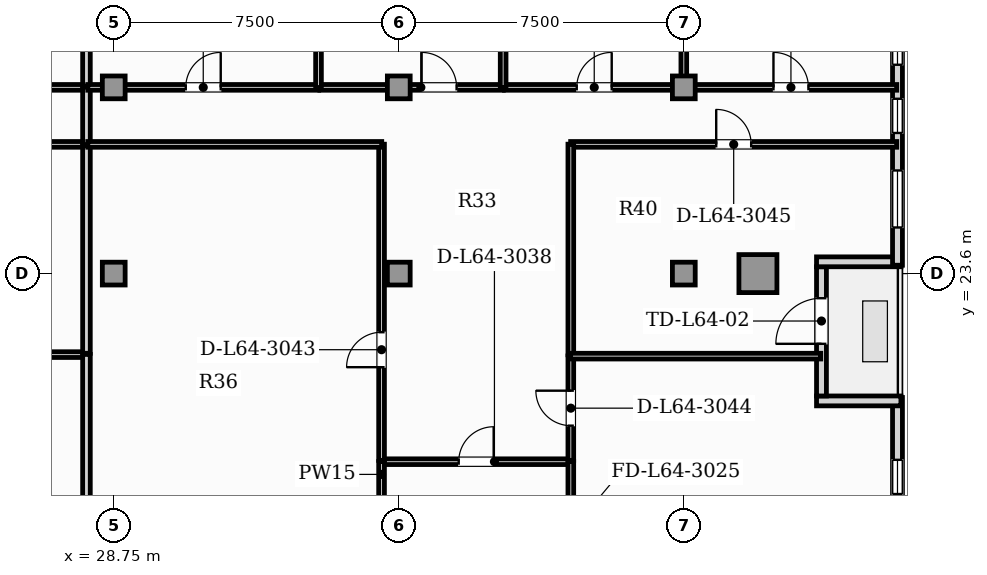
"""IFC4 building model, lengths in metres.
Left out: names, types, materials, properties, quantities, classifications, styles, units other than length and angle.
Written with IfcOpenShell. Run it as: python <this file> out.ifc"""

import sys

from ifc_helpers import new_model, si_unit, direction, frame, frame_2d, origin, origin_2d, place, context, subcontext, project, spatial, rectangle, hollow_rectangle, extrude, element, fill, save


model = new_model("IFC4")
c1 = context("Model", 3, precision=1e-05, world=origin(), true_north=direction((0.0, 1.0)))
c2 = subcontext(c1, "Body", "Model", "MODEL_VIEW")
j1 = project(units=[si_unit("LENGTHUNIT", "METRE"), si_unit("PLANEANGLEUNIT", "RADIAN")], contexts=[c1])
p1 = place(None, origin())
s1 = spatial("IfcSite", under=j1, at=p1, CompositionType="ELEMENT")
p2 = place(p1, origin())
s2 = spatial("IfcBuilding", under=s1, at=p2, CompositionType="ELEMENT")
p3 = place(p2, frame((0.0, 0.0, 260.6)))
s3 = spatial("IfcBuildingStorey", under=s2, at=p3, CompositionType="ELEMENT", Elevation=260.6)
p4 = place(p3, frame((45.7, 23.6, 0.0), z_axis=(0.0, 0.0, 1.0), x_axis=(1.0, 0.0, 0.0)))
e1 = element("IfcColumn", 1, at=p4, inside=s3, PredefinedType="USERDEFINED", context=c2, shape_type="SweptSolid", body=[
    extrude(hollow_rectangle(XDim=1.0, YDim=1.0, WallThickness=0.06, at=origin_2d()), origin(), (0.0, 0.0, 1.0), 3.85),
])
for number, where, z_axis, x_axis in (
    (2, (28.75, 23.6, 0.0), (0.0, 0.0, 1.0), (1.0, 0.0, 0.0)),
    (3, (36.25, 23.6, 0.0), (0.0, 0.0, 1.0), (1.0, 0.0, 0.0)),
    (4, (43.75, 23.6, 0.0), (0.0, 0.0, 1.0), (1.0, 0.0, 0.0)),
    (5, (28.75, 28.5, 0.0), (0.0, 0.0, 1.0), (1.0, 0.0, 0.0)),
    (6, (36.25, 28.5, 0.0), (0.0, 0.0, 1.0), (1.0, 0.0, 0.0)),
    (7, (43.75, 28.5, 0.0), (0.0, 0.0, 1.0), (1.0, 0.0, 0.0)),
):
    element("IfcColumn", number, at=place(p3, frame(where, z_axis=z_axis, x_axis=x_axis)), inside=s3, PredefinedType="COLUMN", context=c2, shape_type="SweptSolid", body=[
        extrude(rectangle(XDim=0.6, YDim=0.6, at=origin_2d()), origin(), (0.0, 0.0, 1.0), 3.85),
    ])
p5 = place(p3, frame((49.372, 3.24, 0.0), z_axis=(0.0, 0.0, 1.0), x_axis=(0.0, 1.0, 0.0)))
e8 = element("IfcWall", 8, at=p5, inside=s3, PredefinedType="SOLIDWALL", context=c2, shape_type="SweptSolid", body=[
    extrude(rectangle(XDim=17.1, YDim=0.26, at=frame_2d((8.55, 0.0))), origin(), (0.0, 0.0, 1.0), 3.65),
])
p6 = place(p5, frame((11.055, 0.0, 0.95)))
e9 = element("IfcOpeningElement", 9, at=p6, cuts=e8, PredefinedType="OPENING", context=c2, shape_type="SweptSolid", body=[
    extrude(rectangle(XDim=0.9, YDim=1.5, at=frame_2d((0.45, 0.75))), frame((0.0, 0.14, 0.0), z_axis=(0.0, -1.0, 0.0), x_axis=(1.0, 0.0, 0.0)), (0.0, 0.0, 1.0), 0.28),
])
p7 = place(p5, frame((12.885, 0.0, 0.95)))
e10 = element("IfcOpeningElement", 10, at=p7, cuts=e8, PredefinedType="OPENING", context=c2, shape_type="SweptSolid", body=[
    extrude(rectangle(XDim=0.9, YDim=1.5, at=frame_2d((0.45, 0.75))), frame((0.0, 0.14, 0.0), z_axis=(0.0, -1.0, 0.0), x_axis=(1.0, 0.0, 0.0)), (0.0, 0.0, 1.0), 0.28),
])
p8 = place(p5, frame((14.56, 0.0, 0.95)))
e11 = element("IfcOpeningElement", 11, at=p8, cuts=e8, PredefinedType="OPENING", context=c2, shape_type="SweptSolid", body=[
    extrude(rectangle(XDim=0.9, YDim=1.5, at=frame_2d((0.45, 0.75))), frame((0.0, 0.14, 0.0), z_axis=(0.0, -1.0, 0.0), x_axis=(1.0, 0.0, 0.0)), (0.0, 0.0, 1.0), 0.28),
])
p9 = place(p3, frame((49.462, 20.25, 0.0), z_axis=(0.0, 0.0, 1.0), x_axis=(-1.0, 0.0, 0.0)))
e12 = element("IfcWall", 12, at=p9, inside=s3, PredefinedType="SOLIDWALL", context=c2, shape_type="SweptSolid", body=[
    extrude(rectangle(XDim=2.22, YDim=0.26, at=frame_2d((1.11, 0.0))), origin(), (0.0, 0.0, 1.0), 3.65),
])
p10 = place(p3, frame((47.372, 20.38, 0.0), z_axis=(0.0, 0.0, 1.0), x_axis=(0.0, 1.0, 0.0)))
e13 = element("IfcWall", 13, at=p10, inside=s3, PredefinedType="SOLIDWALL", context=c2, shape_type="SweptSolid", body=[
    extrude(rectangle(XDim=3.4, YDim=0.26, at=frame_2d((1.7, 0.0))), origin(), (0.0, 0.0, 1.0), 3.19),
])
p11 = place(p10, frame((1.372, 0.0, 0.0)))
e14 = element("IfcOpeningElement", 14, at=p11, cuts=e13, PredefinedType="OPENING", context=c2, shape_type="SweptSolid", body=[
    extrude(rectangle(XDim=1.2, YDim=2.2, at=frame_2d((0.6, 1.1))), frame((0.0, 0.14, 0.0), z_axis=(0.0, -1.0, 0.0), x_axis=(1.0, 0.0, 0.0)), (0.0, 0.0, 1.0), 0.28),
])
p12 = place(p3, frame((47.242, 23.91, 0.0), z_axis=(0.0, 0.0, 1.0), x_axis=(1.0, 0.0, 0.0)))
e15 = element("IfcWall", 15, at=p12, inside=s3, PredefinedType="SOLIDWALL", context=c2, shape_type="SweptSolid", body=[
    extrude(rectangle(XDim=2.22, YDim=0.26, at=frame_2d((1.11, 0.0))), origin(), (0.0, 0.0, 1.0), 3.65),
])
p13 = place(p3, frame((49.372, 23.82, 0.0), z_axis=(0.0, 0.0, 1.0), x_axis=(0.0, 1.0, 0.0)))
e16 = element("IfcWall", 16, at=p13, inside=s3, PredefinedType="SOLIDWALL", context=c2, shape_type="SweptSolid", body=[
    extrude(rectangle(XDim=8.7, YDim=0.26, at=frame_2d((4.35, 0.0))), origin(), (0.0, 0.0, 1.0), 3.65),
])
p14 = place(p13, frame((3.48, 0.0, 0.95)))
e17 = element("IfcOpeningElement", 17, at=p14, cuts=e16, PredefinedType="OPENING", context=c2, shape_type="SweptSolid", body=[
    extrude(rectangle(XDim=0.9, YDim=1.5, at=frame_2d((0.45, 0.75))), frame((0.0, 0.14, 0.0), z_axis=(0.0, -1.0, 0.0), x_axis=(1.0, 0.0, 0.0)), (0.0, 0.0, 1.0), 0.28),
])
p15 = place(p13, frame((0.993, 0.0, 0.9)))
e18 = element("IfcOpeningElement", 18, at=p15, cuts=e16, PredefinedType="OPENING", context=c2, shape_type="SweptSolid", body=[
    extrude(rectangle(XDim=1.5, YDim=1.95, at=frame_2d((0.75, 0.975))), frame((0.0, 0.14, 0.0), z_axis=(0.0, -1.0, 0.0), x_axis=(1.0, 0.0, 0.0)), (0.0, 0.0, 1.0), 0.28),
])
p16 = place(p13, frame((5.275, 0.0, 0.9)))
e19 = element("IfcOpeningElement", 19, at=p16, cuts=e16, PredefinedType="OPENING", context=c2, shape_type="SweptSolid", body=[
    extrude(rectangle(XDim=1.5, YDim=1.95, at=frame_2d((0.75, 0.975))), frame((0.0, 0.14, 0.0), z_axis=(0.0, -1.0, 0.0), x_axis=(1.0, 0.0, 0.0)), (0.0, 0.0, 1.0), 0.28),
])
p17 = place(p3, frame((20.895, 27.0, 0.0), z_axis=(0.0, 0.0, 1.0), x_axis=(1.0, 0.0, 0.0)))
e20 = element("IfcWall", 20, at=p17, inside=s3, PredefinedType="PARTITIONING", context=c2, shape_type="SweptSolid", body=[
    extrude(rectangle(XDim=7.143, YDim=0.15, at=frame_2d((3.571, 0.0))), origin(), (0.0, 0.0, 1.0), 3.65),
])
p18 = place(p17, frame((3.111, 0.0, 0.0)))
e21 = element("IfcOpeningElement", 21, at=p18, cuts=e20, PredefinedType="OPENING", context=c2, shape_type="SweptSolid", body=[
    extrude(rectangle(XDim=0.92, YDim=2.1, at=frame_2d((0.46, 1.05))), frame((0.0, 0.085, 0.0), z_axis=(0.0, -1.0, 0.0), x_axis=(1.0, 0.0, 0.0)), (0.0, 0.0, 1.0), 0.17),
])
p19 = place(p3, frame((22.539, 28.5, 0.0), z_axis=(0.0, 0.0, 1.0), x_axis=(1.0, 0.0, 0.0)))
e22 = element("IfcWall", 22, at=p19, inside=s3, PredefinedType="PARTITIONING", context=c2, shape_type="SweptSolid", body=[
    extrude(rectangle(XDim=5.499, YDim=0.15, at=frame_2d((2.749, 0.0))), origin(), (0.0, 0.0, 1.0), 3.105),
])
p20 = place(p19, frame((2.289, 0.0, 0.0)))
e23 = element("IfcOpeningElement", 23, at=p20, cuts=e22, PredefinedType="OPENING", context=c2, shape_type="SweptSolid", body=[
    extrude(rectangle(XDim=0.92, YDim=2.1, at=frame_2d((0.46, 1.05))), frame((0.0, 0.085, 0.0), z_axis=(0.0, -1.0, 0.0), x_axis=(1.0, 0.0, 0.0)), (0.0, 0.0, 1.0), 0.17),
])
p21 = place(p3, frame((28.032, 26.995, 0.0), z_axis=(0.0, 0.0, 1.0), x_axis=(0.0, 1.0, 0.0)))
e24 = element("IfcWall", 24, at=p21, inside=s3, PredefinedType="PARTITIONING", context=c2, shape_type="SweptSolid", body=[
    extrude(rectangle(XDim=1.51, YDim=0.2, at=frame_2d((0.755, 0.0))), origin(), (0.0, 0.0, 1.0), 3.65),
])
p22 = place(p3, frame((20.895, 21.469, 0.0), z_axis=(0.0, 0.0, 1.0), x_axis=(1.0, 0.0, 0.0)))
e25 = element("IfcWall", 25, at=p22, inside=s3, PredefinedType="PARTITIONING", context=c2, shape_type="SweptSolid", body=[
    extrude(rectangle(XDim=7.143, YDim=0.15, at=frame_2d((3.571, 0.0))), origin(), (0.0, 0.0, 1.0), 3.65),
])
p23 = place(p3, frame((28.032, 17.525, 0.0), z_axis=(0.0, 0.0, 1.0), x_axis=(0.0, 1.0, 0.0)))
e26 = element("IfcWall", 26, at=p23, inside=s3, PredefinedType="PARTITIONING", context=c2, shape_type="SweptSolid", body=[
    extrude(rectangle(XDim=3.948, YDim=0.2, at=frame_2d((1.974, 0.0))), origin(), (0.0, 0.0, 1.0), 3.65),
])
p24 = place(p3, frame((28.032, 21.503, 0.0), z_axis=(0.0, 0.0, 1.0), x_axis=(0.0, 1.0, 0.0)))
e27 = element("IfcWall", 27, at=p24, inside=s3, PredefinedType="PARTITIONING", context=c2, shape_type="SweptSolid", body=[
    extrude(rectangle(XDim=5.462, YDim=0.2, at=frame_2d((2.731, 0.0))), origin(), (0.0, 0.0, 1.0), 3.65),
])
p25 = place(p3, frame((28.032, 28.535, 0.0), z_axis=(0.0, 0.0, 1.0), x_axis=(0.0, 1.0, 0.0)))
e28 = element("IfcWall", 28, at=p25, inside=s3, PredefinedType="PARTITIONING", context=c2, shape_type="SweptSolid", body=[
    extrude(rectangle(XDim=7.076, YDim=0.2, at=frame_2d((3.538, 0.0))), origin(), (0.0, 0.0, 1.0), 3.65),
])
p26 = place(p3, frame((35.792, 18.651, 0.0), z_axis=(0.0, 0.0, 1.0), x_axis=(1.0, 0.0, 0.0)))
e29 = element("IfcWall", 29, at=p26, inside=s3, PredefinedType="PARTITIONING", context=c2, shape_type="SweptSolid", body=[
    extrude(rectangle(XDim=4.99, YDim=0.15, at=frame_2d((2.495, 0.0))), origin(), (0.0, 0.0, 1.0), 3.65),
])
p27 = place(p26, frame((2.035, 0.0, 0.0)))
e30 = element("IfcOpeningElement", 30, at=p27, cuts=e29, PredefinedType="OPENING", context=c2, shape_type="SweptSolid", body=[
    extrude(rectangle(XDim=0.92, YDim=2.1, at=frame_2d((0.46, 1.05))), frame((0.0, 0.085, 0.0), z_axis=(0.0, -1.0, 0.0), x_axis=(1.0, 0.0, 0.0)), (0.0, 0.0, 1.0), 0.17),
])
for number, where, z_axis, x_axis in (
    (31, (35.797, 17.525, 0.0), (0.0, 0.0, 1.0), (0.0, 1.0, 0.0)),
    (32, (40.777, 17.525, 0.0), (0.0, 0.0, 1.0), (0.0, 1.0, 0.0)),
):
    element("IfcWall", number, at=place(p3, frame(where, z_axis=z_axis, x_axis=x_axis)), inside=s3, PredefinedType="PARTITIONING", context=c2, shape_type="SweptSolid", body=[
        extrude(rectangle(XDim=1.131, YDim=0.15, at=frame_2d((0.565, 0.0))), origin(), (0.0, 0.0, 1.0), 3.65),
    ])
p28 = place(p3, frame((35.797, 18.686, 0.0), z_axis=(0.0, 0.0, 1.0), x_axis=(0.0, 1.0, 0.0)))
e33 = element("IfcWall", 33, at=p28, inside=s3, PredefinedType="PARTITIONING", context=c2, shape_type="SweptSolid", body=[
    extrude(rectangle(XDim=8.319, YDim=0.15, at=frame_2d((4.16, 0.0))), origin(), (0.0, 0.0, 1.0), 3.65),
])
p29 = place(p28, frame((2.452, 0.0, 0.0)))
e34 = element("IfcOpeningElement", 34, at=p29, cuts=e33, PredefinedType="OPENING", context=c2, shape_type="SweptSolid", body=[
    extrude(rectangle(XDim=0.92, YDim=2.1, at=frame_2d((0.46, 1.05))), frame((0.0, 0.085, 0.0), z_axis=(0.0, -1.0, 0.0), x_axis=(1.0, 0.0, 0.0)), (0.0, 0.0, 1.0), 0.17),
])
p30 = place(p3, frame((28.067, 27.0, 0.0), z_axis=(0.0, 0.0, 1.0), x_axis=(1.0, 0.0, 0.0)))
e35 = element("IfcWall", 35, at=p30, inside=s3, PredefinedType="PARTITIONING", context=c2, shape_type="SweptSolid", body=[
    extrude(rectangle(XDim=7.735, YDim=0.15, at=frame_2d((3.867, 0.0))), origin(), (0.0, 0.0, 1.0), 3.65),
])
p31 = place(p3, frame((40.777, 18.686, 0.0), z_axis=(0.0, 0.0, 1.0), x_axis=(0.0, 1.0, 0.0)))
e36 = element("IfcWall", 36, at=p31, inside=s3, PredefinedType="PARTITIONING", context=c2, shape_type="SweptSolid", body=[
    extrude(rectangle(XDim=2.747, YDim=0.15, at=frame_2d((1.374, 0.0))), origin(), (0.0, 0.0, 1.0), 3.65),
])
p32 = place(p31, frame((0.914, 0.0, 0.0)))
e37 = element("IfcOpeningElement", 37, at=p32, cuts=e36, PredefinedType="OPENING", context=c2, shape_type="SweptSolid", body=[
    extrude(rectangle(XDim=0.92, YDim=2.1, at=frame_2d((0.46, 1.05))), frame((0.0, 0.085, 0.0), z_axis=(0.0, -1.0, 0.0), x_axis=(1.0, 0.0, 0.0)), (0.0, 0.0, 1.0), 0.17),
])
p33 = place(p3, frame((40.772, 27.0, 0.0), z_axis=(0.0, 0.0, 1.0), x_axis=(1.0, 0.0, 0.0)))
e38 = element("IfcWall", 38, at=p33, inside=s3, PredefinedType="PARTITIONING", context=c2, shape_type="SweptSolid", body=[
    extrude(rectangle(XDim=8.581, YDim=0.15, at=frame_2d((4.29, 0.0))), origin(), (0.0, 0.0, 1.0), 3.65),
])
p34 = place(p33, frame((3.83, 0.0, 0.0)))
e39 = element("IfcOpeningElement", 39, at=p34, cuts=e38, PredefinedType="OPENING", context=c2, shape_type="SweptSolid", body=[
    extrude(rectangle(XDim=0.92, YDim=2.1, at=frame_2d((0.46, 1.05))), frame((0.0, 0.085, 0.0), z_axis=(0.0, -1.0, 0.0), x_axis=(1.0, 0.0, 0.0)), (0.0, 0.0, 1.0), 0.17),
])
p35 = place(p3, frame((40.777, 21.463, 0.0), z_axis=(0.0, 0.0, 1.0), x_axis=(0.0, 1.0, 0.0)))
e40 = element("IfcWall", 40, at=p35, inside=s3, PredefinedType="PARTITIONING", context=c2, shape_type="SweptSolid", body=[
    extrude(rectangle(XDim=5.542, YDim=0.15, at=frame_2d((2.771, 0.0))), origin(), (0.0, 0.0, 1.0), 3.65),
])
p36 = place(p3, frame((28.067, 28.5, 0.0), z_axis=(0.0, 0.0, 1.0), x_axis=(1.0, 0.0, 0.0)))
e41 = element("IfcWall", 41, at=p36, inside=s3, PredefinedType="PARTITIONING", context=c2, shape_type="SweptSolid", body=[
    extrude(rectangle(XDim=6.076, YDim=0.15, at=frame_2d((3.038, 0.0))), origin(), (0.0, 0.0, 1.0), 3.105),
])
p37 = place(p36, frame((2.578, 0.0, 0.0)))
e42 = element("IfcOpeningElement", 42, at=p37, cuts=e41, PredefinedType="OPENING", context=c2, shape_type="SweptSolid", body=[
    extrude(rectangle(XDim=0.92, YDim=2.1, at=frame_2d((0.46, 1.05))), frame((0.0, 0.085, 0.0), z_axis=(0.0, -1.0, 0.0), x_axis=(1.0, 0.0, 0.0)), (0.0, 0.0, 1.0), 0.17),
])
p38 = place(p3, frame((34.173, 28.5, 0.0), z_axis=(0.0, 0.0, 1.0), x_axis=(1.0, 0.0, 0.0)))
e43 = element("IfcWall", 43, at=p38, inside=s3, PredefinedType="PARTITIONING", context=c2, shape_type="SweptSolid", body=[
    extrude(rectangle(XDim=4.828, YDim=0.15, at=frame_2d((2.414, 0.0))), origin(), (0.0, 0.0, 1.0), 3.105),
])
p39 = place(p38, frame((2.678, 0.0, 0.0)))
e44 = element("IfcOpeningElement", 44, at=p39, cuts=e43, PredefinedType="OPENING", context=c2, shape_type="SweptSolid", body=[
    extrude(rectangle(XDim=0.92, YDim=2.1, at=frame_2d((0.46, 1.05))), frame((0.0, 0.085, 0.0), z_axis=(0.0, -1.0, 0.0), x_axis=(1.0, 0.0, 0.0)), (0.0, 0.0, 1.0), 0.17),
])
p40 = place(p3, frame((39.031, 28.5, 0.0), z_axis=(0.0, 0.0, 1.0), x_axis=(1.0, 0.0, 0.0)))
e45 = element("IfcWall", 45, at=p40, inside=s3, PredefinedType="PARTITIONING", context=c2, shape_type="SweptSolid", body=[
    extrude(rectangle(XDim=4.724, YDim=0.15, at=frame_2d((2.362, 0.0))), origin(), (0.0, 0.0, 1.0), 3.105),
])
p41 = place(p40, frame((1.902, 0.0, 0.0)))
e46 = element("IfcOpeningElement", 46, at=p41, cuts=e45, PredefinedType="OPENING", context=c2, shape_type="SweptSolid", body=[
    extrude(rectangle(XDim=0.92, YDim=2.1, at=frame_2d((0.46, 1.05))), frame((0.0, 0.085, 0.0), z_axis=(0.0, -1.0, 0.0), x_axis=(1.0, 0.0, 0.0)), (0.0, 0.0, 1.0), 0.17),
])
p42 = place(p3, frame((43.785, 28.5, 0.0), z_axis=(0.0, 0.0, 1.0), x_axis=(1.0, 0.0, 0.0)))
e47 = element("IfcWall", 47, at=p42, inside=s3, PredefinedType="PARTITIONING", context=c2, shape_type="SweptSolid", body=[
    extrude(rectangle(XDim=5.568, YDim=0.15, at=frame_2d((2.784, 0.0))), origin(), (0.0, 0.0, 1.0), 3.65),
])
p43 = place(p42, frame((2.324, 0.0, 0.0)))
e48 = element("IfcOpeningElement", 48, at=p43, cuts=e47, PredefinedType="OPENING", context=c2, shape_type="SweptSolid", body=[
    extrude(rectangle(XDim=0.92, YDim=2.1, at=frame_2d((0.46, 1.05))), frame((0.0, 0.085, 0.0), z_axis=(0.0, -1.0, 0.0), x_axis=(1.0, 0.0, 0.0)), (0.0, 0.0, 1.0), 0.17),
])
p44 = place(p3, frame((40.772, 21.428, 0.0), z_axis=(0.0, 0.0, 1.0), x_axis=(1.0, 0.0, 0.0)))
e49 = element("IfcWall", 49, at=p44, inside=s3, PredefinedType="PARTITIONING", context=c2, shape_type="SweptSolid", body=[
    extrude(rectangle(XDim=6.581, YDim=0.15, at=frame_2d((3.29, 0.0))), origin(), (0.0, 0.0, 1.0), 3.65),
])
for number, where, z_axis, x_axis in (
    (50, (34.138, 28.495, 0.0), (0.0, 0.0, 1.0), (0.0, 1.0, 0.0)),
    (51, (38.996, 28.495, 0.0), (0.0, 0.0, 1.0), (0.0, 1.0, 0.0)),
    (52, (43.75, 28.495, 0.0), (0.0, 0.0, 1.0), (0.0, 1.0, 0.0)),
):
    element("IfcWall", number, at=place(p3, frame(where, z_axis=z_axis, x_axis=x_axis)), inside=s3, PredefinedType="PARTITIONING", context=c2, shape_type="SweptSolid", body=[
        extrude(rectangle(XDim=7.116, YDim=0.15, at=frame_2d((3.558, 0.0))), origin(), (0.0, 0.0, 1.0), 3.65),
    ])
p45 = place(p11, frame((1.2, 0.0, 0.0), z_axis=(0.0, 0.0, 1.0), x_axis=(-1.0, 0.0, 0.0)))
e53 = element("IfcDoor", 53, at=p45, inside=s3, OperationType="SINGLE_SWING_RIGHT", PredefinedType="DOOR", context=c2, shape_type="SweptSolid", body=[
    extrude(rectangle(XDim=1.2, YDim=2.2, at=frame_2d((0.6, 1.1))), frame((0.0, 0.025, 0.0), z_axis=(0.0, -1.0, 0.0), x_axis=(1.0, 0.0, 0.0)), (0.0, 0.0, 1.0), 0.05),
])
fill(e14, e53)
p46 = place(p14, origin())
e54 = element("IfcWindow", 54, at=p46, inside=s3, PartitioningType="SINGLE_PANEL", PredefinedType="WINDOW", context=c2, shape_type="SweptSolid", body=[
    extrude(rectangle(XDim=0.9, YDim=1.5, at=frame_2d((0.45, 0.75))), frame((0.0, 0.03, 0.0), z_axis=(0.0, -1.0, 0.0), x_axis=(1.0, 0.0, 0.0)), (0.0, 0.0, 1.0), 0.06),
])
fill(e17, e54)
p47 = place(p8, origin())
e55 = element("IfcWindow", 55, at=p47, inside=s3, PartitioningType="SINGLE_PANEL", PredefinedType="WINDOW", context=c2, shape_type="SweptSolid", body=[
    extrude(rectangle(XDim=0.9, YDim=1.5, at=frame_2d((0.45, 0.75))), frame((0.0, 0.03, 0.0), z_axis=(0.0, -1.0, 0.0), x_axis=(1.0, 0.0, 0.0)), (0.0, 0.0, 1.0), 0.06),
])
fill(e11, e55)
p48 = place(p15, origin())
e56 = element("IfcWindow", 56, at=p48, inside=s3, PartitioningType="SINGLE_PANEL", PredefinedType="WINDOW", context=c2, shape_type="SweptSolid", body=[
    extrude(rectangle(XDim=1.5, YDim=1.95, at=frame_2d((0.75, 0.975))), frame((0.0, 0.03, 0.0), z_axis=(0.0, -1.0, 0.0), x_axis=(1.0, 0.0, 0.0)), (0.0, 0.0, 1.0), 0.06),
])
fill(e18, e56)
p49 = place(p16, origin())
e57 = element("IfcWindow", 57, at=p49, inside=s3, PartitioningType="SINGLE_PANEL", PredefinedType="WINDOW", context=c2, shape_type="SweptSolid", body=[
    extrude(rectangle(XDim=1.5, YDim=1.95, at=frame_2d((0.75, 0.975))), frame((0.0, 0.03, 0.0), z_axis=(0.0, -1.0, 0.0), x_axis=(1.0, 0.0, 0.0)), (0.0, 0.0, 1.0), 0.06),
])
fill(e19, e57)
p50 = place(p27, origin())
e58 = element("IfcDoor", 58, at=p50, inside=s3, OperationType="SINGLE_SWING_RIGHT", PredefinedType="DOOR", context=c2, shape_type="SweptSolid", body=[
    extrude(rectangle(XDim=0.92, YDim=2.1, at=frame_2d((0.46, 1.05))), frame((0.0, 0.025, 0.0), z_axis=(0.0, -1.0, 0.0), x_axis=(1.0, 0.0, 0.0)), (0.0, 0.0, 1.0), 0.05),
])
fill(e30, e58)
p51 = place(p29, origin())
e59 = element("IfcDoor", 59, at=p51, inside=s3, OperationType="SINGLE_SWING_LEFT", PredefinedType="DOOR", context=c2, shape_type="SweptSolid", body=[
    extrude(rectangle(XDim=0.92, YDim=2.1, at=frame_2d((0.46, 1.05))), frame((0.0, 0.025, 0.0), z_axis=(0.0, -1.0, 0.0), x_axis=(1.0, 0.0, 0.0)), (0.0, 0.0, 1.0), 0.05),
])
fill(e34, e59)
p52 = place(p32, origin())
e60 = element("IfcDoor", 60, at=p52, inside=s3, OperationType="SINGLE_SWING_RIGHT", PredefinedType="DOOR", context=c2, shape_type="SweptSolid", body=[
    extrude(rectangle(XDim=0.92, YDim=2.1, at=frame_2d((0.46, 1.05))), frame((0.0, 0.025, 0.0), z_axis=(0.0, -1.0, 0.0), x_axis=(1.0, 0.0, 0.0)), (0.0, 0.0, 1.0), 0.05),
])
fill(e37, e60)
p53 = place(p34, origin())
e61 = element("IfcDoor", 61, at=p53, inside=s3, OperationType="SINGLE_SWING_LEFT", PredefinedType="DOOR", context=c2, shape_type="SweptSolid", body=[
    extrude(rectangle(XDim=0.92, YDim=2.1, at=frame_2d((0.46, 1.05))), frame((0.0, 0.025, 0.0), z_axis=(0.0, -1.0, 0.0), x_axis=(1.0, 0.0, 0.0)), (0.0, 0.0, 1.0), 0.05),
])
fill(e39, e61)
p54 = place(p37, origin())
e62 = element("IfcDoor", 62, at=p54, inside=s3, OperationType="SINGLE_SWING_RIGHT", PredefinedType="DOOR", context=c2, shape_type="SweptSolid", body=[
    extrude(rectangle(XDim=0.92, YDim=2.1, at=frame_2d((0.46, 1.05))), frame((0.0, 0.025, 0.0), z_axis=(0.0, -1.0, 0.0), x_axis=(1.0, 0.0, 0.0)), (0.0, 0.0, 1.0), 0.05),
])
fill(e42, e62)
p55 = place(p39, origin())
e63 = element("IfcDoor", 63, at=p55, inside=s3, OperationType="SINGLE_SWING_LEFT", PredefinedType="DOOR", context=c2, shape_type="SweptSolid", body=[
    extrude(rectangle(XDim=0.92, YDim=2.1, at=frame_2d((0.46, 1.05))), frame((0.0, 0.025, 0.0), z_axis=(0.0, -1.0, 0.0), x_axis=(1.0, 0.0, 0.0)), (0.0, 0.0, 1.0), 0.05),
])
fill(e44, e63)
p56 = place(p41, origin())
e64 = element("IfcDoor", 64, at=p56, inside=s3, OperationType="SINGLE_SWING_RIGHT", PredefinedType="DOOR", context=c2, shape_type="SweptSolid", body=[
    extrude(rectangle(XDim=0.92, YDim=2.1, at=frame_2d((0.46, 1.05))), frame((0.0, 0.025, 0.0), z_axis=(0.0, -1.0, 0.0), x_axis=(1.0, 0.0, 0.0)), (0.0, 0.0, 1.0), 0.05),
])
fill(e46, e64)
p57 = place(p43, origin())
e65 = element("IfcDoor", 65, at=p57, inside=s3, OperationType="SINGLE_SWING_LEFT", PredefinedType="DOOR", context=c2, shape_type="SweptSolid", body=[
    extrude(rectangle(XDim=0.92, YDim=2.1, at=frame_2d((0.46, 1.05))), frame((0.0, 0.025, 0.0), z_axis=(0.0, -1.0, 0.0), x_axis=(1.0, 0.0, 0.0)), (0.0, 0.0, 1.0), 0.05),
])
fill(e48, e65)
save(model, sys.argv[1])
